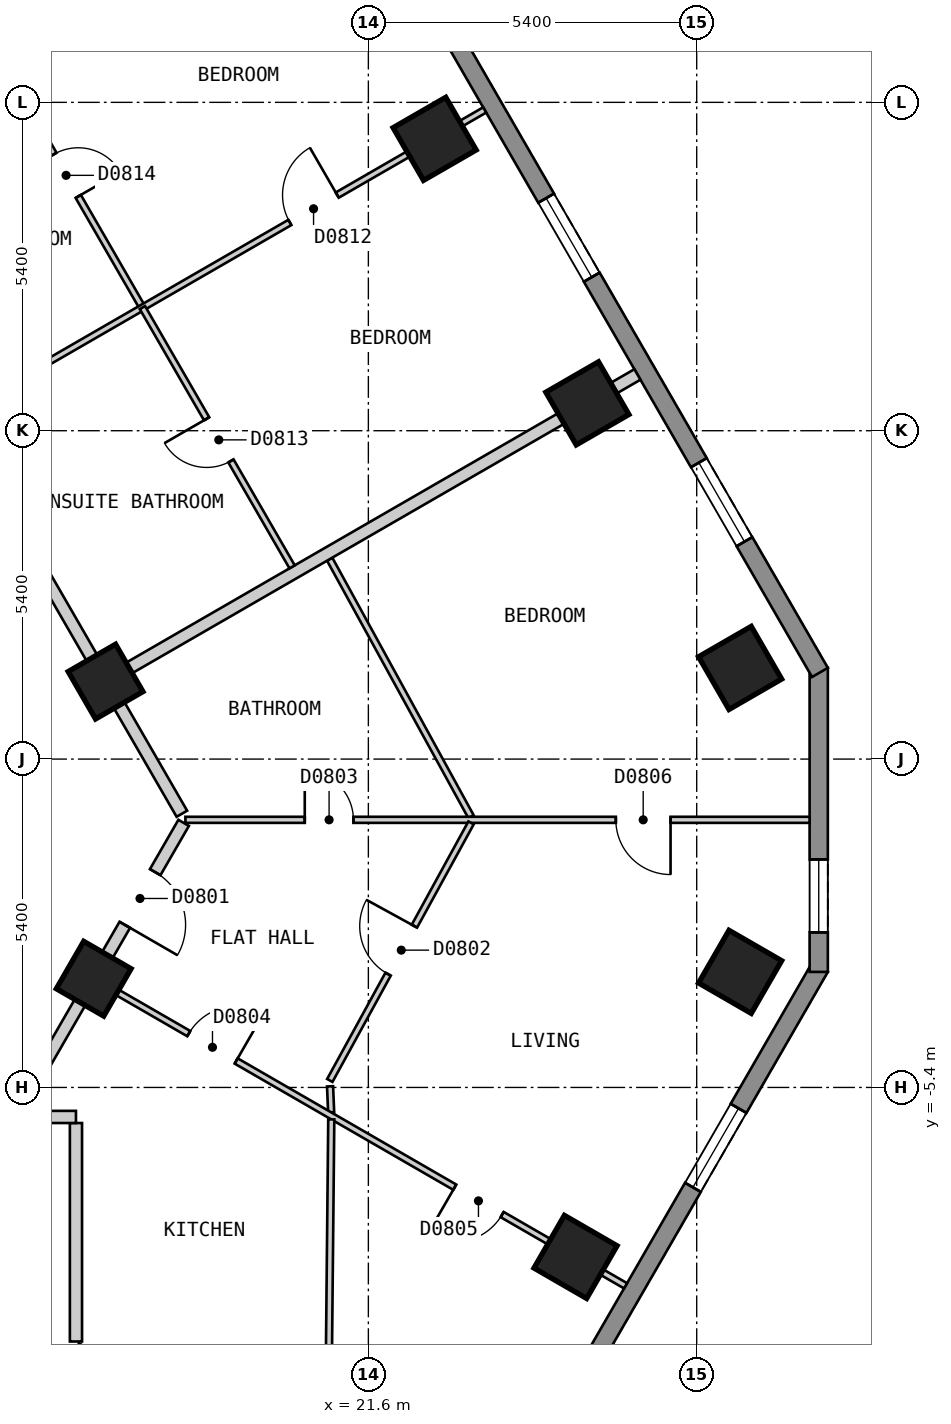
"""IFC4 building model, lengths in metres.
Left out: names, types, materials, properties, quantities, classifications, styles, units other than length and angle.
Written with IfcOpenShell. Run it as: python <this file> out.ifc"""

import sys

from ifc_helpers import new_model, si_unit, direction, frame, frame_2d, origin, origin_2d, place, context, subcontext, project, spatial, polyline, rectangle, outline, extrude, element, fill, save


model = new_model("IFC4")
c1 = context("Model", 3, precision=1e-05, world=origin(), true_north=direction((0.0, 1.0)))
c2 = subcontext(c1, "Body", "Model", "MODEL_VIEW")
j1 = project(units=[si_unit("LENGTHUNIT", "METRE"), si_unit("PLANEANGLEUNIT", "RADIAN")], contexts=[c1])
p1 = place(None, origin())
s1 = spatial("IfcSite", under=j1, at=p1, CompositionType="ELEMENT")
p2 = place(p1, origin())
s2 = spatial("IfcBuilding", under=s1, at=p2, CompositionType="ELEMENT")
p3 = place(p2, frame((0.0, 0.0, 72.0)))
s3 = spatial("IfcBuildingStorey", under=s2, at=p3, CompositionType="ELEMENT", Elevation=72.0)
for number, where, z_axis, x_axis in (
    (1, (25.007, -8.187, 0.0), (0.0, 0.0, 1.0), (0.5, 0.866, 0.0)),
    (2, (27.714, -3.499, 0.0), (0.0, 0.0, 1.0), (0.5, 0.866, 0.0)),
    (3, (27.714, 1.499, 0.0), (0.0, 0.0, 1.0), (-0.5, 0.866, 0.0)),
    (4, (25.202, 5.85, 0.0), (0.0, 0.0, 1.0), (-0.5, 0.866, 0.0)),
    (5, (22.69, 10.2, 0.0), (0.0, 0.0, 1.0), (-0.5, 0.866, 0.0)),
):
    element("IfcColumn", number, at=place(p3, frame(where, z_axis=z_axis, x_axis=x_axis)), inside=s3, PredefinedType="COLUMN", context=c2, shape_type="SweptSolid", body=[
        extrude(rectangle(XDim=1.0, YDim=1.0, at=origin_2d()), origin(), (0.0, 0.0, 1.0), 3.0),
    ])
for number, where, z_axis, x_axis in (
    (6, (17.083, -3.612, 0.0), (0.0, 0.0, 1.0), (0.5, 0.866, 0.0)),
    (7, (17.278, 1.274, 0.0), (0.0, 0.0, 1.0), (-0.5, 0.866, 0.0)),
):
    element("IfcColumn", number, at=place(p3, frame(where, z_axis=z_axis, x_axis=x_axis)), inside=s3, PredefinedType="COLUMN", context=c2, shape_type="SweptSolid", body=[
        extrude(rectangle(XDim=0.9, YDim=0.9, at=origin_2d()), origin(), (0.0, 0.0, 1.0), 3.0),
    ])
p4 = place(p3, frame((17.479, -23.425, 0.0), z_axis=(0.0, 0.0, 1.0), x_axis=(0.500035407905, 0.866004960056, 0.0)))
e8 = element("IfcWall", 8, at=p4, inside=s3, PredefinedType="SOLIDWALL", context=c2, shape_type="SweptSolid", body=[
    extrude(outline(polyline([(0.0, -0.15), (23.094, -0.15), (23.014, 0.15), (0.08, 0.15), (0.0, -0.15)])), origin(), (0.0, 0.0, 1.0), 2.7),
])
p5 = place(p4, frame((2.677, 0.0, 0.15)))
e9 = element("IfcOpeningElement", 9, at=p5, cuts=e8, PredefinedType="OPENING", context=c2, shape_type="SweptSolid", body=[
    extrude(rectangle(XDim=1.5, YDim=2.1, at=frame_2d((0.75, 1.05))), frame((0.0, 0.16, 0.0), z_axis=(0.0, -1.0, 0.0), x_axis=(1.0, 0.0, 0.0)), (0.0, 0.0, 1.0), 0.32),
])
p6 = place(p4, frame((8.091, 0.0, 0.15)))
e10 = element("IfcOpeningElement", 10, at=p6, cuts=e8, PredefinedType="OPENING", context=c2, shape_type="SweptSolid", body=[
    extrude(rectangle(XDim=1.5, YDim=2.1, at=frame_2d((0.75, 1.05))), frame((0.0, 0.16, 0.0), z_axis=(0.0, -1.0, 0.0), x_axis=(1.0, 0.0, 0.0)), (0.0, 0.0, 1.0), 0.32),
])
p7 = place(p4, frame((13.504, 0.0, 0.15)))
e11 = element("IfcOpeningElement", 11, at=p7, cuts=e8, PredefinedType="OPENING", context=c2, shape_type="SweptSolid", body=[
    extrude(rectangle(XDim=1.5, YDim=2.1, at=frame_2d((0.75, 1.05))), frame((0.0, 0.16, 0.0), z_axis=(0.0, -1.0, 0.0), x_axis=(1.0, 0.0, 0.0)), (0.0, 0.0, 1.0), 0.32),
])
p8 = place(p4, frame((18.917, 0.0, 0.15)))
e12 = element("IfcOpeningElement", 12, at=p8, cuts=e8, PredefinedType="OPENING", context=c2, shape_type="SweptSolid", body=[
    extrude(rectangle(XDim=1.5, YDim=2.1, at=frame_2d((0.75, 1.05))), frame((0.0, 0.16, 0.0), z_axis=(0.0, -1.0, 0.0), x_axis=(1.0, 0.0, 0.0)), (0.0, 0.0, 1.0), 0.32),
])
p9 = place(p3, frame((29.007, -3.5, 0.0), z_axis=(0.0, 0.0, 1.0), x_axis=(0.0, 1.0, 0.0)))
e13 = element("IfcWall", 13, at=p9, inside=s3, PredefinedType="SOLIDWALL", context=c2, shape_type="SweptSolid", body=[
    extrude(outline(polyline([(0.0, -0.15), (5.0, -0.15), (4.92, 0.15), (0.08, 0.15), (0.0, -0.15)])), origin(), (0.0, 0.0, 1.0), 2.7),
])
p10 = place(p9, frame((0.65, 0.0, 0.15)))
e14 = element("IfcOpeningElement", 14, at=p10, cuts=e13, PredefinedType="OPENING", context=c2, shape_type="SweptSolid", body=[
    extrude(rectangle(XDim=1.2, YDim=2.1, at=frame_2d((0.6, 1.05))), frame((0.0, 0.16, 0.0), z_axis=(0.0, -1.0, 0.0), x_axis=(1.0, 0.0, 0.0)), (0.0, 0.0, 1.0), 0.32),
])
p11 = place(p3, frame((29.027, 1.425, 0.0), z_axis=(0.0, 0.0, 1.0), x_axis=(-0.500027479704, 0.866009537788, 0.0)))
e15 = element("IfcWall", 15, at=p11, inside=s3, PredefinedType="SOLIDWALL", context=c2, shape_type="SweptSolid", body=[
    extrude(outline(polyline([(0.0, -0.15), (26.559, -0.15), (26.478, 0.15), (0.08, 0.15), (0.0, -0.15)])), origin(), (0.0, 0.0, 1.0), 2.7),
])
p12 = place(p11, frame((2.483, 0.0, 0.15)))
e16 = element("IfcOpeningElement", 16, at=p12, cuts=e15, PredefinedType="OPENING", context=c2, shape_type="SweptSolid", body=[
    extrude(rectangle(XDim=1.5, YDim=2.1, at=frame_2d((0.75, 1.05))), frame((0.0, 0.16, 0.0), z_axis=(0.0, -1.0, 0.0), x_axis=(1.0, 0.0, 0.0)), (0.0, 0.0, 1.0), 0.32),
])
p13 = place(p11, frame((7.506, 0.0, 0.15)))
e17 = element("IfcOpeningElement", 17, at=p13, cuts=e15, PredefinedType="OPENING", context=c2, shape_type="SweptSolid", body=[
    extrude(rectangle(XDim=1.5, YDim=2.1, at=frame_2d((0.75, 1.05))), frame((0.0, 0.16, 0.0), z_axis=(0.0, -1.0, 0.0), x_axis=(1.0, 0.0, 0.0)), (0.0, 0.0, 1.0), 0.32),
])
p14 = place(p11, frame((12.529, 0.0, 0.15)))
e18 = element("IfcOpeningElement", 18, at=p14, cuts=e15, PredefinedType="OPENING", context=c2, shape_type="SweptSolid", body=[
    extrude(rectangle(XDim=1.5, YDim=2.1, at=frame_2d((0.75, 1.05))), frame((0.0, 0.16, 0.0), z_axis=(0.0, -1.0, 0.0), x_axis=(1.0, 0.0, 0.0)), (0.0, 0.0, 1.0), 0.32),
])
p15 = place(p11, frame((17.552, 0.0, 0.15)))
e19 = element("IfcOpeningElement", 19, at=p15, cuts=e15, PredefinedType="OPENING", context=c2, shape_type="SweptSolid", body=[
    extrude(rectangle(XDim=1.5, YDim=2.1, at=frame_2d((0.75, 1.05))), frame((0.0, 0.16, 0.0), z_axis=(0.0, -1.0, 0.0), x_axis=(1.0, 0.0, 0.0)), (0.0, 0.0, 1.0), 0.32),
])
p16 = place(p11, frame((22.575, 0.0, 0.15)))
e20 = element("IfcOpeningElement", 20, at=p16, cuts=e15, PredefinedType="OPENING", context=c2, shape_type="SweptSolid", body=[
    extrude(rectangle(XDim=1.5, YDim=2.1, at=frame_2d((0.75, 1.05))), frame((0.0, 0.16, 0.0), z_axis=(0.0, -1.0, 0.0), x_axis=(1.0, 0.0, 0.0)), (0.0, 0.0, 1.0), 0.32),
])
p17 = place(p3, frame((8.488, 16.5, 0.0), z_axis=(0.0, 0.0, 1.0), x_axis=(0.499986836607, -0.86603300354, 0.0)))
e21 = element("IfcWall", 21, at=p17, inside=s3, PredefinedType="PARTITIONING", context=c2, shape_type="SweptSolid", body=[
    extrude(rectangle(XDim=20.09, YDim=0.2, at=frame_2d((10.045, 0.0))), origin(), (0.0, 0.0, 1.0), 2.7),
])
p18 = place(p17, frame((4.523, 0.0, 0.0)))
e22 = element("IfcOpeningElement", 22, at=p18, cuts=e21, PredefinedType="OPENING", context=c2, shape_type="SweptSolid", body=[
    extrude(rectangle(XDim=1.0, YDim=2.1, at=frame_2d((0.5, 1.05))), frame((0.0, 0.11, 0.0), z_axis=(0.0, -1.0, 0.0), x_axis=(1.0, 0.0, 0.0)), (0.0, 0.0, 1.0), 0.22),
])
p19 = place(p3, frame((16.791, -5.985, 0.0), z_axis=(0.0, 0.0, 1.0), x_axis=(0.0, -1.0, 0.0)))
e23 = element("IfcWall", 23, at=p19, inside=s3, PredefinedType="PARTITIONING", context=c2, shape_type="SweptSolid", body=[
    extrude(rectangle(XDim=3.593, YDim=0.2, at=frame_2d((1.796, 0.0))), origin(), (0.0, 0.0, 1.0), 2.7),
])
p20 = place(p3, frame((15.887, -5.885, 0.0), z_axis=(0.0, 0.0, 1.0), x_axis=(1.0, 0.0, 0.0)))
e24 = element("IfcWall", 24, at=p20, inside=s3, PredefinedType="PARTITIONING", context=c2, shape_type="SweptSolid", body=[
    extrude(rectangle(XDim=0.904, YDim=0.2, at=frame_2d((0.452, 0.0))), origin(), (0.0, 0.0, 1.0), 2.7),
])
p21 = place(p3, frame((15.771, -5.884, 0.0), z_axis=(0.0, 0.0, 1.0), x_axis=(0.499939494019, 0.866060334111, 0.0)))
e25 = element("IfcWall", 25, at=p21, inside=s3, PredefinedType="PARTITIONING", context=c2, shape_type="SweptSolid", body=[
    extrude(rectangle(XDim=5.583, YDim=0.2, at=frame_2d((2.792, 0.0))), origin(), (0.0, 0.0, 1.0), 2.7),
])
p22 = place(p21, frame((3.647, 0.0, 0.0)))
e26 = element("IfcOpeningElement", 26, at=p22, cuts=e25, PredefinedType="OPENING", context=c2, shape_type="SweptSolid", body=[
    extrude(rectangle(XDim=1.0, YDim=2.1, at=frame_2d((0.5, 1.05))), frame((0.0, 0.11, 0.0), z_axis=(0.0, -1.0, 0.0), x_axis=(1.0, 0.0, 0.0)), (0.0, 0.0, 1.0), 0.22),
])
p23 = place(p3, frame((15.398, 11.731, 0.0), z_axis=(0.0, 0.0, 1.0), x_axis=(0.500010064822, -0.866019592779, 0.0)))
e27 = element("IfcWall", 27, at=p23, inside=s3, PredefinedType="PARTITIONING", context=c2, shape_type="SweptSolid", body=[
    extrude(rectangle(XDim=4.972, YDim=0.1, at=frame_2d((2.486, 0.0))), origin(), (0.0, 0.0, 1.0), 2.7),
])
p24 = place(p23, frame((2.061, 0.0, 0.0)))
e28 = element("IfcOpeningElement", 28, at=p24, cuts=e27, PredefinedType="OPENING", context=c2, shape_type="SweptSolid", body=[
    extrude(rectangle(XDim=0.8, YDim=2.1, at=frame_2d((0.4, 1.05))), frame((0.0, 0.06, 0.0), z_axis=(0.0, -1.0, 0.0), x_axis=(1.0, 0.0, 0.0)), (0.0, 0.0, 1.0), 0.12),
])
p25 = place(p3, frame((20.964, 3.287, 0.0), z_axis=(0.0, 0.0, 1.0), x_axis=(0.48115599782, -0.87663499004, 0.0)))
e29 = element("IfcWall", 29, at=p25, inside=s3, PredefinedType="PARTITIONING", context=c2, shape_type="SweptSolid", body=[
    extrude(rectangle(XDim=4.83, YDim=0.1, at=frame_2d((2.415, 0.0))), origin(), (0.0, 0.0, 1.0), 2.7),
])
p26 = place(p3, frame((20.97, -5.382, 0.0), z_axis=(0.0, 0.0, 1.0), x_axis=(0.042272072097, -0.999106136464, 0.0)))
e30 = element("IfcWall", 30, at=p26, inside=s3, PredefinedType="PARTITIONING", context=c2, shape_type="SweptSolid", body=[
    extrude(rectangle(XDim=0.427, YDim=0.1, at=frame_2d((0.214, 0.0))), origin(), (0.0, 0.0, 1.0), 2.7),
])
p27 = place(p3, frame((17.169, -3.662, 0.0), z_axis=(0.0, 0.0, 1.0), x_axis=(0.866047370643, -0.499961950354, 0.0)))
e31 = element("IfcWall", 31, at=p27, inside=s3, PredefinedType="PARTITIONING", context=c2, shape_type="SweptSolid", body=[
    extrude(rectangle(XDim=10.001, YDim=0.1, at=frame_2d((5.0, 0.0))), origin(), (0.0, 0.0, 1.0), 2.7),
])
p28 = place(p27, frame((1.706, 0.0, 0.0)))
e32 = element("IfcOpeningElement", 32, at=p28, cuts=e31, PredefinedType="OPENING", context=c2, shape_type="SweptSolid", body=[
    extrude(rectangle(XDim=0.9, YDim=2.1, at=frame_2d((0.45, 1.05))), frame((0.0, 0.06, 0.0), z_axis=(0.0, -1.0, 0.0), x_axis=(1.0, 0.0, 0.0)), (0.0, 0.0, 1.0), 0.12),
])
p29 = place(p27, frame((6.757, 0.0, 0.0)))
e33 = element("IfcOpeningElement", 33, at=p29, cuts=e31, PredefinedType="OPENING", context=c2, shape_type="SweptSolid", body=[
    extrude(rectangle(XDim=0.9, YDim=2.1, at=frame_2d((0.45, 1.05))), frame((0.0, 0.06, 0.0), z_axis=(0.0, -1.0, 0.0), x_axis=(1.0, 0.0, 0.0)), (0.0, 0.0, 1.0), 0.12),
])
p30 = place(p3, frame((18.591, -0.999, 0.0), z_axis=(0.0, 0.0, 1.0), x_axis=(1.0, 0.0, 0.0)))
e34 = element("IfcWall", 34, at=p30, inside=s3, PredefinedType="PARTITIONING", context=c2, shape_type="SweptSolid", body=[
    extrude(rectangle(XDim=10.266, YDim=0.1, at=frame_2d((5.133, 0.0))), origin(), (0.0, 0.0, 1.0), 2.7),
])
p31 = place(p30, frame((1.963, 0.0, 0.0)))
e35 = element("IfcOpeningElement", 35, at=p31, cuts=e34, PredefinedType="OPENING", context=c2, shape_type="SweptSolid", body=[
    extrude(rectangle(XDim=0.8, YDim=2.1, at=frame_2d((0.4, 1.05))), frame((0.0, 0.06, 0.0), z_axis=(0.0, -1.0, 0.0), x_axis=(1.0, 0.0, 0.0)), (0.0, 0.0, 1.0), 0.12),
])
p32 = place(p30, frame((7.079, 0.0, 0.0)))
e36 = element("IfcOpeningElement", 36, at=p32, cuts=e34, PredefinedType="OPENING", context=c2, shape_type="SweptSolid", body=[
    extrude(rectangle(XDim=0.9, YDim=2.1, at=frame_2d((0.45, 1.05))), frame((0.0, 0.06, 0.0), z_axis=(0.0, -1.0, 0.0), x_axis=(1.0, 0.0, 0.0)), (0.0, 0.0, 1.0), 0.12),
])
p33 = place(p3, frame((20.966, -5.285, 0.0), z_axis=(0.0, 0.0, 1.0), x_axis=(0.480851410542, 0.876802099096, 0.0)))
e37 = element("IfcWall", 37, at=p33, inside=s3, PredefinedType="PARTITIONING", context=c2, shape_type="SweptSolid", body=[
    extrude(rectangle(XDim=4.831, YDim=0.1, at=frame_2d((2.416, 0.0))), origin(), (0.0, 0.0, 1.0), 2.7),
])
p34 = place(p33, frame((1.994, 0.0, 0.0)))
e38 = element("IfcOpeningElement", 38, at=p34, cuts=e37, PredefinedType="OPENING", context=c2, shape_type="SweptSolid", body=[
    extrude(rectangle(XDim=0.9, YDim=2.1, at=frame_2d((0.45, 1.05))), frame((0.0, 0.06, 0.0), z_axis=(0.0, -1.0, 0.0), x_axis=(1.0, 0.0, 0.0)), (0.0, 0.0, 1.0), 0.12),
])
p35 = place(p3, frame((20.93, -11.968, 0.0), z_axis=(0.0, 0.0, 1.0), x_axis=(0.009938100012, 0.999950615865, 0.0)))
e39 = element("IfcWall", 39, at=p35, inside=s3, PredefinedType="PARTITIONING", context=c2, shape_type="SweptSolid", body=[
    extrude(rectangle(XDim=6.043, YDim=0.1, at=frame_2d((3.021, 0.0))), origin(), (0.0, 0.0, 1.0), 2.7),
])
p36 = place(p3, frame((14.853, 5.675, 0.0), z_axis=(0.0, 0.0, 1.0), x_axis=(0.866016855193, 0.500014806302, 0.0)))
e40 = element("IfcWall", 40, at=p36, inside=s3, PredefinedType="PARTITIONING", context=c2, shape_type="SweptSolid", body=[
    extrude(rectangle(XDim=10.0, YDim=0.1, at=frame_2d((5.0, 0.0))), origin(), (0.0, 0.0, 1.0), 2.7),
])
p37 = place(p36, frame((6.3, 0.0, 0.0)))
e41 = element("IfcOpeningElement", 41, at=p37, cuts=e40, PredefinedType="OPENING", context=c2, shape_type="SweptSolid", body=[
    extrude(rectangle(XDim=0.9, YDim=2.1, at=frame_2d((0.45, 1.05))), frame((0.0, 0.06, 0.0), z_axis=(0.0, -1.0, 0.0), x_axis=(1.0, 0.0, 0.0)), (0.0, 0.0, 1.0), 0.12),
])
p38 = place(p3, frame((12.342, 10.025, 0.0), z_axis=(0.0, 0.0, 1.0), x_axis=(0.865992435864, 0.500057097767, 0.0)))
e42 = element("IfcWall", 42, at=p38, inside=s3, PredefinedType="PARTITIONING", context=c2, shape_type="SweptSolid", body=[
    extrude(rectangle(XDim=9.999, YDim=0.1, at=frame_2d((5.0, 0.0))), origin(), (0.0, 0.0, 1.0), 2.7),
])
p39 = place(p38, frame((4.795, 0.0, 0.0)))
e43 = element("IfcOpeningElement", 43, at=p39, cuts=e42, PredefinedType="OPENING", context=c2, shape_type="SweptSolid", body=[
    extrude(rectangle(XDim=0.9, YDim=2.1, at=frame_2d((0.45, 1.05))), frame((0.0, 0.06, 0.0), z_axis=(0.0, -1.0, 0.0), x_axis=(1.0, 0.0, 0.0)), (0.0, 0.0, 1.0), 0.12),
])
p40 = place(p3, frame((16.792, -9.695, 0.0), z_axis=(0.0, 0.0, 1.0), x_axis=(0.86603765469, -0.499978780208, 0.0)))
e44 = element("IfcWall", 44, at=p40, inside=s3, PredefinedType="PARTITIONING", context=c2, shape_type="SweptSolid", body=[
    extrude(rectangle(XDim=7.31, YDim=0.2, at=frame_2d((3.655, 0.0))), origin(), (0.0, 0.0, 1.0), 2.7),
])
p41 = place(p3, frame((17.365, 1.325, 0.0), z_axis=(0.0, 0.0, 1.0), x_axis=(0.866016855193, 0.500014806302, 0.0)))
e45 = element("IfcWall", 45, at=p41, inside=s3, PredefinedType="PARTITIONING", context=c2, shape_type="SweptSolid", body=[
    extrude(rectangle(XDim=10.0, YDim=0.2, at=frame_2d((5.0, 0.0))), origin(), (0.0, 0.0, 1.0), 2.7),
])
p42 = place(p3, frame((17.884, 7.425, 0.0), z_axis=(0.0, 0.0, 1.0), x_axis=(0.500000007376, -0.866025399526, 0.0)))
e46 = element("IfcWall", 46, at=p42, inside=s3, PredefinedType="PARTITIONING", context=c2, shape_type="SweptSolid", body=[
    extrude(rectangle(XDim=4.924, YDim=0.1, at=frame_2d((2.462, 0.0))), origin(), (0.0, 0.0, 1.0), 2.7),
])
p43 = place(p42, frame((2.112, 0.0, 0.0)))
e47 = element("IfcOpeningElement", 47, at=p43, cuts=e46, PredefinedType="OPENING", context=c2, shape_type="SweptSolid", body=[
    extrude(rectangle(XDim=0.8, YDim=2.1, at=frame_2d((0.4, 1.05))), frame((0.0, 0.06, 0.0), z_axis=(0.0, -1.0, 0.0), x_axis=(1.0, 0.0, 0.0)), (0.0, 0.0, 1.0), 0.12),
])
p44 = place(p8, origin())
e48 = element("IfcWindow", 48, at=p44, inside=s3, PartitioningType="SINGLE_PANEL", PredefinedType="WINDOW", context=c2, shape_type="SweptSolid", body=[
    extrude(rectangle(XDim=1.5, YDim=2.1, at=frame_2d((0.75, 1.05))), frame((0.0, 0.03, 0.0), z_axis=(0.0, -1.0, 0.0), x_axis=(1.0, 0.0, 0.0)), (0.0, 0.0, 1.0), 0.06),
])
fill(e12, e48)
p45 = place(p10, origin())
e49 = element("IfcWindow", 49, at=p45, inside=s3, PartitioningType="SINGLE_PANEL", PredefinedType="WINDOW", context=c2, shape_type="SweptSolid", body=[
    extrude(rectangle(XDim=1.2, YDim=2.1, at=frame_2d((0.6, 1.05))), frame((0.0, 0.03, 0.0), z_axis=(0.0, -1.0, 0.0), x_axis=(1.0, 0.0, 0.0)), (0.0, 0.0, 1.0), 0.06),
])
fill(e14, e49)
p46 = place(p12, origin())
e50 = element("IfcWindow", 50, at=p46, inside=s3, PartitioningType="SINGLE_PANEL", PredefinedType="WINDOW", context=c2, shape_type="SweptSolid", body=[
    extrude(rectangle(XDim=1.5, YDim=2.1, at=frame_2d((0.75, 1.05))), frame((0.0, 0.03, 0.0), z_axis=(0.0, -1.0, 0.0), x_axis=(1.0, 0.0, 0.0)), (0.0, 0.0, 1.0), 0.06),
])
fill(e16, e50)
p47 = place(p13, origin())
e51 = element("IfcWindow", 51, at=p47, inside=s3, PartitioningType="SINGLE_PANEL", PredefinedType="WINDOW", context=c2, shape_type="SweptSolid", body=[
    extrude(rectangle(XDim=1.5, YDim=2.1, at=frame_2d((0.75, 1.05))), frame((0.0, 0.03, 0.0), z_axis=(0.0, -1.0, 0.0), x_axis=(1.0, 0.0, 0.0)), (0.0, 0.0, 1.0), 0.06),
])
fill(e17, e51)
p48 = place(p22, origin())
e52 = element("IfcDoor", 52, at=p48, inside=s3, OperationType="SINGLE_SWING_LEFT", PredefinedType="DOOR", context=c2, shape_type="SweptSolid", body=[
    extrude(rectangle(XDim=1.0, YDim=2.1, at=frame_2d((0.5, 1.05))), frame((0.0, 0.025, 0.0), z_axis=(0.0, -1.0, 0.0), x_axis=(1.0, 0.0, 0.0)), (0.0, 0.0, 1.0), 0.05),
])
fill(e26, e52)
p49 = place(p34, origin())
e53 = element("IfcDoor", 53, at=p49, inside=s3, OperationType="SINGLE_SWING_RIGHT", PredefinedType="DOOR", context=c2, shape_type="SweptSolid", body=[
    extrude(rectangle(XDim=0.9, YDim=2.1, at=frame_2d((0.45, 1.05))), frame((0.0, 0.025, 0.0), z_axis=(0.0, -1.0, 0.0), x_axis=(1.0, 0.0, 0.0)), (0.0, 0.0, 1.0), 0.05),
])
fill(e38, e53)
p50 = place(p31, origin())
e54 = element("IfcDoor", 54, at=p50, inside=s3, OperationType="SINGLE_SWING_LEFT", PredefinedType="DOOR", context=c2, shape_type="SweptSolid", body=[
    extrude(rectangle(XDim=0.8, YDim=2.1, at=frame_2d((0.4, 1.05))), frame((0.0, 0.025, 0.0), z_axis=(0.0, -1.0, 0.0), x_axis=(1.0, 0.0, 0.0)), (0.0, 0.0, 1.0), 0.05),
])
fill(e35, e54)
p51 = place(p28, origin())
e55 = element("IfcDoor", 55, at=p51, inside=s3, OperationType="SINGLE_SWING_RIGHT", PredefinedType="DOOR", context=c2, shape_type="SweptSolid", body=[
    extrude(rectangle(XDim=0.9, YDim=2.1, at=frame_2d((0.45, 1.05))), frame((0.0, 0.025, 0.0), z_axis=(0.0, -1.0, 0.0), x_axis=(1.0, 0.0, 0.0)), (0.0, 0.0, 1.0), 0.05),
])
fill(e32, e55)
p52 = place(p29, origin())
e56 = element("IfcDoor", 56, at=p52, inside=s3, OperationType="SINGLE_SWING_LEFT", PredefinedType="DOOR", context=c2, shape_type="SweptSolid", body=[
    extrude(rectangle(XDim=0.9, YDim=2.1, at=frame_2d((0.45, 1.05))), frame((0.0, 0.025, 0.0), z_axis=(0.0, -1.0, 0.0), x_axis=(1.0, 0.0, 0.0)), (0.0, 0.0, 1.0), 0.05),
])
fill(e33, e56)
p53 = place(p32, origin())
e57 = element("IfcDoor", 57, at=p53, inside=s3, OperationType="SINGLE_SWING_RIGHT", PredefinedType="DOOR", context=c2, shape_type="SweptSolid", body=[
    extrude(rectangle(XDim=0.9, YDim=2.1, at=frame_2d((0.45, 1.05))), frame((0.0, 0.025, 0.0), z_axis=(0.0, -1.0, 0.0), x_axis=(1.0, 0.0, 0.0)), (0.0, 0.0, 1.0), 0.05),
])
fill(e36, e57)
p54 = place(p37, origin())
e58 = element("IfcDoor", 58, at=p54, inside=s3, OperationType="SINGLE_SWING_RIGHT", PredefinedType="DOOR", context=c2, shape_type="SweptSolid", body=[
    extrude(rectangle(XDim=0.9, YDim=2.1, at=frame_2d((0.45, 1.05))), frame((0.0, 0.025, 0.0), z_axis=(0.0, -1.0, 0.0), x_axis=(1.0, 0.0, 0.0)), (0.0, 0.0, 1.0), 0.05),
])
fill(e41, e58)
p55 = place(p43, origin())
e59 = element("IfcDoor", 59, at=p55, inside=s3, OperationType="SINGLE_SWING_LEFT", PredefinedType="DOOR", context=c2, shape_type="SweptSolid", body=[
    extrude(rectangle(XDim=0.8, YDim=2.1, at=frame_2d((0.4, 1.05))), frame((0.0, 0.025, 0.0), z_axis=(0.0, -1.0, 0.0), x_axis=(1.0, 0.0, 0.0)), (0.0, 0.0, 1.0), 0.05),
])
fill(e47, e59)
p56 = place(p24, origin())
e60 = element("IfcDoor", 60, at=p56, inside=s3, OperationType="SINGLE_SWING_RIGHT", PredefinedType="DOOR", context=c2, shape_type="SweptSolid", body=[
    extrude(rectangle(XDim=0.8, YDim=2.1, at=frame_2d((0.4, 1.05))), frame((0.0, 0.025, 0.0), z_axis=(0.0, -1.0, 0.0), x_axis=(1.0, 0.0, 0.0)), (0.0, 0.0, 1.0), 0.05),
])
fill(e28, e60)
save(model, sys.argv[1])
